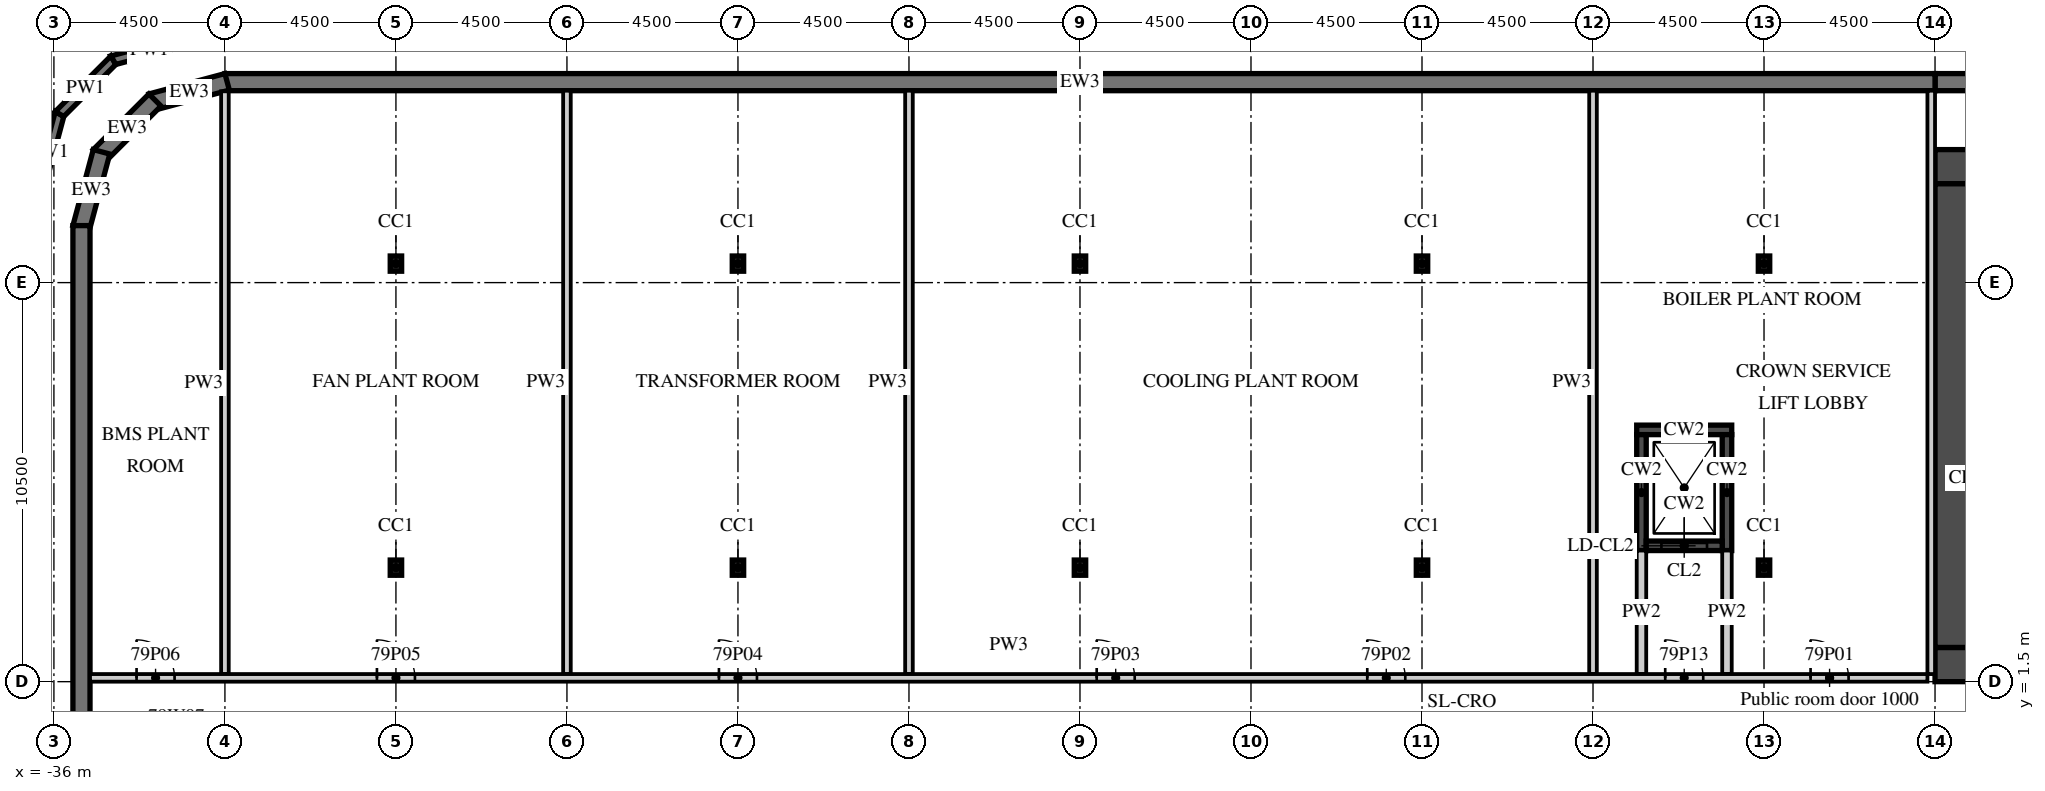
"""IFC4 building model, lengths in metres.
Left out: names, types, materials, properties, quantities, classifications, styles, units other than length and angle.
Written with IfcOpenShell. Run it as: python <this file> out.ifc"""

import sys

from ifc_helpers import new_model, si_unit, direction, frame, frame_2d, origin, origin_2d, place, context, subcontext, project, spatial, polyline, rectangle, i_section, outline, extrude, element, fill, save


model = new_model("IFC4")
c1 = context("Model", 3, precision=1e-05, world=origin(), true_north=direction((0.0, 1.0)))
c2 = subcontext(c1, "Body", "Model", "MODEL_VIEW")
j1 = project(units=[si_unit("LENGTHUNIT", "METRE"), si_unit("PLANEANGLEUNIT", "RADIAN")], contexts=[c1])
p1 = place(None, origin())
s1 = spatial("IfcSite", under=j1, at=p1, CompositionType="ELEMENT")
p2 = place(p1, origin())
s2 = spatial("IfcBuilding", under=s1, at=p2, CompositionType="ELEMENT")
p3 = place(p2, frame((0.0, 0.0, 313.6)))
s3 = spatial("IfcBuildingStorey", under=s2, at=p3, CompositionType="ELEMENT", Elevation=313.6)
for number, where, z_axis, x_axis in (
    (1, (-27.0, 4.5, 0.0), (0.0, 0.0, 1.0), (1.0, 0.0, 0.0)),
    (2, (-27.0, 12.5, 0.0), (0.0, 0.0, 1.0), (1.0, 0.0, 0.0)),
    (3, (-18.0, 4.5, 0.0), (0.0, 0.0, 1.0), (1.0, 0.0, 0.0)),
    (4, (-18.0, 12.5, 0.0), (0.0, 0.0, 1.0), (1.0, 0.0, 0.0)),
    (5, (-9.0, 4.5, 0.0), (0.0, 0.0, 1.0), (1.0, 0.0, 0.0)),
    (6, (-9.0, 12.5, 0.0), (0.0, 0.0, 1.0), (1.0, 0.0, 0.0)),
    (7, (0.0, 4.5, 0.0), (0.0, 0.0, 1.0), (1.0, 0.0, 0.0)),
    (8, (0.0, 12.5, 0.0), (0.0, 0.0, 1.0), (1.0, 0.0, 0.0)),
    (9, (9.0, 4.5, 0.0), (0.0, 0.0, 1.0), (1.0, 0.0, 0.0)),
    (10, (9.0, 12.5, 0.0), (0.0, 0.0, 1.0), (1.0, 0.0, 0.0)),
):
    element("IfcColumn", number, at=place(p3, frame(where, z_axis=z_axis, x_axis=x_axis)), inside=s3, PredefinedType="COLUMN", context=c2, shape_type="SweptSolid", body=[
        extrude(i_section(OverallWidth=0.3, OverallDepth=0.4, WebThickness=0.013, FlangeThickness=0.024, FilletRadius=0.027, at=origin_2d()), origin(), (0.0, 0.0, 1.0), 4.2),
    ])
p4 = place(p3, frame((31.5, 17.275, 0.0), z_axis=(0.0, 0.0, 1.0), x_axis=(-1.0, 0.0, 0.0)))
e11 = element("IfcWall", 11, at=p4, inside=s3, PredefinedType="SOLIDWALL", context=c2, shape_type="SweptSolid", body=[
    extrude(rectangle(XDim=18.0, YDim=0.45, at=frame_2d((9.0, 0.0))), origin(), (0.0, 0.0, 1.0), 3.8),
])
p5 = place(p3, frame((13.5, 17.275, 0.0), z_axis=(0.0, 0.0, 1.0), x_axis=(-1.0, 0.0, 0.0)))
e12 = element("IfcWall", 12, at=p5, inside=s3, PredefinedType="SOLIDWALL", context=c2, shape_type="SweptSolid", body=[
    extrude(rectangle(XDim=45.0, YDim=0.45, at=frame_2d((22.5, 0.0))), origin(), (0.0, 0.0, 1.0), 3.8),
])
p6 = place(p3, frame((-31.442, 17.283, 0.0), z_axis=(0.0, 0.0, 1.0), x_axis=(-0.965926999034, -0.25881466832, 0.0)))
e13 = element("IfcWall", 13, at=p6, inside=s3, PredefinedType="SOLIDWALL", context=c2, shape_type="SweptSolid", body=[
    extrude(outline(polyline([(0.0, -0.225), (2.071, -0.225), (1.95, 0.225), (0.121, 0.225), (0.0, -0.225)])), origin(), (0.0, 0.0, 1.0), 3.8),
])
p7 = place(p3, frame((-33.341, 16.805, 0.0), z_axis=(0.0, 0.0, 1.0), x_axis=(-0.707106781187, -0.707106781187, 0.0)))
e14 = element("IfcWall", 14, at=p7, inside=s3, PredefinedType="SOLIDWALL", context=c2, shape_type="SweptSolid", body=[
    extrude(outline(polyline([(0.0, -0.225), (2.071, -0.225), (1.95, 0.225), (0.121, 0.225), (0.0, -0.225)])), origin(), (0.0, 0.0, 1.0), 3.8),
])
p8 = place(p3, frame((-34.747, 15.442, 0.0), z_axis=(0.0, 0.0, 1.0), x_axis=(-0.25881466832, -0.965926999034, 0.0)))
e15 = element("IfcWall", 15, at=p8, inside=s3, PredefinedType="SOLIDWALL", context=c2, shape_type="SweptSolid", body=[
    extrude(outline(polyline([(-0.0, -0.225), (2.07, -0.225), (1.95, 0.225), (0.12, 0.225), (-0.0, -0.225)])), origin(), (0.0, 0.0, 1.0), 3.8),
])
p9 = place(p3, frame((-35.275, 13.5, 0.0), z_axis=(0.0, 0.0, 1.0), x_axis=(0.0, -1.0, 0.0)))
e16 = element("IfcWall", 16, at=p9, inside=s3, PredefinedType="SOLIDWALL", context=c2, shape_type="SweptSolid", body=[
    extrude(rectangle(XDim=28.0, YDim=0.45, at=frame_2d((14.0, 0.0))), origin(), (0.0, 0.0, 1.0), 3.8),
])
p10 = place(p3, origin())
e17 = element("IfcWall", 17, at=p10, inside=s3, PredefinedType="PARAPET", context=c2, shape_type="SweptSolid", body=[
    extrude(outline(polyline([(-36.5, 14.5), (-36.25, 14.467), (-35.74, 16.371), (-35.964, 16.5), (-36.5, 14.5)])), origin(), (0.0, 0.0, 1.0), 1.1),
])
p11 = place(p3, origin())
e18 = element("IfcWall", 18, at=p11, inside=s3, PredefinedType="PARAPET", context=c2, shape_type="SweptSolid", body=[
    extrude(outline(polyline([(-35.964, 16.5), (-35.74, 16.371), (-34.371, 17.74), (-34.5, 17.964), (-35.964, 16.5)])), origin(), (0.0, 0.0, 1.0), 1.1),
])
p12 = place(p3, origin())
e19 = element("IfcWall", 19, at=p12, inside=s3, PredefinedType="PARAPET", context=c2, shape_type="SweptSolid", body=[
    extrude(outline(polyline([(-34.5, 17.964), (-34.371, 17.74), (-32.467, 18.25), (-32.5, 18.5), (-34.5, 17.964)])), origin(), (0.0, 0.0, 1.0), 1.1),
])
p13 = place(p3, frame((5.65, 8.125, 0.0), z_axis=(0.0, 0.0, 1.0), x_axis=(1.0, 0.0, 0.0)))
e20 = element("IfcWall", 20, at=p13, inside=s3, PredefinedType="SHEAR", context=c2, shape_type="SweptSolid", body=[
    extrude(rectangle(XDim=2.5, YDim=0.25, at=frame_2d((1.25, 0.0))), origin(), (0.0, 0.0, 1.0), 3.8),
])
for number, where, z_axis, x_axis in (
    (21, (8.025, 4.95, 0.0), (0.0, 0.0, 1.0), (0.0, 1.0, 0.0)),
    (22, (5.775, 4.95, 0.0), (0.0, 0.0, 1.0), (0.0, 1.0, 0.0)),
):
    element("IfcWall", number, at=place(p3, frame(where, z_axis=z_axis, x_axis=x_axis)), inside=s3, PredefinedType="SHEAR", context=c2, shape_type="SweptSolid", body=[
        extrude(rectangle(XDim=3.05, YDim=0.25, at=frame_2d((1.525, 0.0))), origin(), (0.0, 0.0, 1.0), 3.8),
    ])
p14 = place(p3, frame((5.9, 5.075, 0.0), z_axis=(0.0, 0.0, 1.0), x_axis=(1.0, 0.0, 0.0)))
e23 = element("IfcWall", 23, at=p14, inside=s3, PredefinedType="SHEAR", context=c2, shape_type="SweptSolid", body=[
    extrude(rectangle(XDim=2.0, YDim=0.25, at=frame_2d((1.0, 0.0))), origin(), (0.0, 0.0, 1.0), 3.8),
])
p15 = place(p14, frame((0.4, 0.0, 0.0)))
e24 = element("IfcOpeningElement", 24, at=p15, cuts=e23, PredefinedType="OPENING", context=c2, shape_type="SweptSolid", body=[
    extrude(rectangle(XDim=1.2, YDim=2.1, at=frame_2d((0.6, 1.05))), frame((0.0, 0.135, 0.0), z_axis=(0.0, -1.0, 0.0), x_axis=(1.0, 0.0, 0.0)), (0.0, 0.0, 1.0), 0.27),
])
for number, where, z_axis, x_axis in (
    (25, (8.025, 1.7, 0.0), (0.0, 0.0, 1.0), (0.0, 1.0, 0.0)),
    (26, (5.775, 1.7, 0.0), (0.0, 0.0, 1.0), (0.0, 1.0, 0.0)),
):
    element("IfcWall", number, at=place(p3, frame(where, z_axis=z_axis, x_axis=x_axis)), inside=s3, PredefinedType="PARTITIONING", context=c2, shape_type="SweptSolid", body=[
        extrude(rectangle(XDim=3.25, YDim=0.25, at=frame_2d((1.625, 0.0))), origin(), (0.0, 0.0, 1.0), 3.8),
    ])
p16 = place(p3, frame((13.5, 1.95, 0.0), z_axis=(0.0, 0.0, 1.0), x_axis=(1.0, 0.0, 0.0)))
e27 = element("IfcWall", 27, at=p16, inside=s3, PredefinedType="SHEAR", context=c2, shape_type="SweptSolid", body=[
    extrude(rectangle(XDim=18.0, YDim=0.9, at=frame_2d((9.0, 0.0))), origin(), (0.0, 0.0, 1.0), 3.8),
])
p17 = place(p16, frame((1.475, 0.0, 0.0)))
e28 = element("IfcOpeningElement", 28, at=p17, cuts=e27, PredefinedType="OPENING", context=c2, shape_type="SweptSolid", body=[
    extrude(rectangle(XDim=1.8, YDim=2.1, at=frame_2d((0.9, 1.05))), frame((0.0, 0.46, 0.0), z_axis=(0.0, -1.0, 0.0), x_axis=(1.0, 0.0, 0.0)), (0.0, 0.0, 1.0), 0.92),
])
p18 = place(p3, frame((13.5, 15.05, 0.0), z_axis=(0.0, 0.0, 1.0), x_axis=(1.0, 0.0, 0.0)))
e29 = element("IfcWall", 29, at=p18, inside=s3, PredefinedType="SHEAR", context=c2, shape_type="SweptSolid", body=[
    extrude(rectangle(XDim=6.8, YDim=0.9, at=frame_2d((3.4, 0.0))), origin(), (0.0, 0.0, 1.0), 3.8),
])
p19 = place(p18, frame((4.725, 0.0, 0.0)))
e30 = element("IfcOpeningElement", 30, at=p19, cuts=e29, PredefinedType="OPENING", context=c2, shape_type="SweptSolid", body=[
    extrude(rectangle(XDim=1.2, YDim=2.1, at=frame_2d((0.6, 1.05))), frame((0.0, 0.46, 0.0), z_axis=(0.0, -1.0, 0.0), x_axis=(1.0, 0.0, 0.0)), (0.0, 0.0, 1.0), 0.92),
])
p20 = place(p3, frame((13.95, 2.4, 0.0), z_axis=(0.0, 0.0, 1.0), x_axis=(0.0, 1.0, 0.0)))
e31 = element("IfcWall", 31, at=p20, inside=s3, PredefinedType="SHEAR", context=c2, shape_type="SweptSolid", body=[
    extrude(rectangle(XDim=12.2, YDim=0.9, at=frame_2d((6.1, 0.0))), origin(), (0.0, 0.0, 1.0), 3.8),
])
for number, where, z_axis, x_axis in (
    (32, (4.5, 1.7, 0.0), (0.0, 0.0, 1.0), (0.0, 1.0, 0.0)),
    (33, (-13.5, 1.7, 0.0), (0.0, 0.0, 1.0), (0.0, 1.0, 0.0)),
    (34, (-22.5, 1.7, 0.0), (0.0, 0.0, 1.0), (0.0, 1.0, 0.0)),
):
    element("IfcWall", number, at=place(p3, frame(where, z_axis=z_axis, x_axis=x_axis)), inside=s3, PredefinedType="PARTITIONING", context=c2, shape_type="SweptSolid", body=[
        extrude(rectangle(XDim=15.35, YDim=0.2, at=frame_2d((7.675, 0.0))), origin(), (0.0, 0.0, 1.0), 3.8),
    ])
p21 = place(p3, frame((-31.5, 1.7, 0.0), z_axis=(0.0, 0.0, 1.0), x_axis=(0.0, 1.0, 0.0)))
e35 = element("IfcWall", 35, at=p21, inside=s3, PredefinedType="PARTITIONING", context=c2, shape_type="SweptSolid", body=[
    extrude(rectangle(XDim=15.334, YDim=0.2, at=frame_2d((7.667, 0.0))), origin(), (0.0, 0.0, 1.0), 3.8),
])
p22 = place(p3, frame((-35.05, 1.6, 0.0), z_axis=(0.0, 0.0, 1.0), x_axis=(1.0, 0.0, 0.0)))
e36 = element("IfcWall", 36, at=p22, inside=s3, PredefinedType="PARTITIONING", context=c2, shape_type="SweptSolid", body=[
    extrude(rectangle(XDim=48.35, YDim=0.2, at=frame_2d((24.175, 0.0))), origin(), (0.0, 0.0, 1.0), 3.3),
])
p23 = place(p22, frame((45.275, 0.0, 0.0)))
e37 = element("IfcOpeningElement", 37, at=p23, cuts=e36, PredefinedType="OPENING", context=c2, shape_type="SweptSolid", body=[
    extrude(rectangle(XDim=1.0, YDim=2.1, at=frame_2d((0.5, 1.05))), frame((0.0, 0.11, 0.0), z_axis=(0.0, -1.0, 0.0), x_axis=(1.0, 0.0, 0.0)), (0.0, 0.0, 1.0), 0.22),
])
p24 = place(p22, frame((33.61, 0.0, 0.0)))
e38 = element("IfcOpeningElement", 38, at=p24, cuts=e36, PredefinedType="OPENING", context=c2, shape_type="SweptSolid", body=[
    extrude(rectangle(XDim=1.0, YDim=2.1, at=frame_2d((0.5, 1.05))), frame((0.0, 0.11, 0.0), z_axis=(0.0, -1.0, 0.0), x_axis=(1.0, 0.0, 0.0)), (0.0, 0.0, 1.0), 0.22),
])
p25 = place(p22, frame((26.49, 0.0, 0.0)))
e39 = element("IfcOpeningElement", 39, at=p25, cuts=e36, PredefinedType="OPENING", context=c2, shape_type="SweptSolid", body=[
    extrude(rectangle(XDim=1.0, YDim=2.1, at=frame_2d((0.5, 1.05))), frame((0.0, 0.11, 0.0), z_axis=(0.0, -1.0, 0.0), x_axis=(1.0, 0.0, 0.0)), (0.0, 0.0, 1.0), 0.22),
])
p26 = place(p22, frame((16.55, 0.0, 0.0)))
e40 = element("IfcOpeningElement", 40, at=p26, cuts=e36, PredefinedType="OPENING", context=c2, shape_type="SweptSolid", body=[
    extrude(rectangle(XDim=1.0, YDim=2.1, at=frame_2d((0.5, 1.05))), frame((0.0, 0.11, 0.0), z_axis=(0.0, -1.0, 0.0), x_axis=(1.0, 0.0, 0.0)), (0.0, 0.0, 1.0), 0.22),
])
p27 = place(p22, frame((7.55, 0.0, 0.0)))
e41 = element("IfcOpeningElement", 41, at=p27, cuts=e36, PredefinedType="OPENING", context=c2, shape_type="SweptSolid", body=[
    extrude(rectangle(XDim=1.0, YDim=2.1, at=frame_2d((0.5, 1.05))), frame((0.0, 0.11, 0.0), z_axis=(0.0, -1.0, 0.0), x_axis=(1.0, 0.0, 0.0)), (0.0, 0.0, 1.0), 0.22),
])
p28 = place(p22, frame((1.225, 0.0, 0.0)))
e42 = element("IfcOpeningElement", 42, at=p28, cuts=e36, PredefinedType="OPENING", context=c2, shape_type="SweptSolid", body=[
    extrude(rectangle(XDim=1.0, YDim=2.1, at=frame_2d((0.5, 1.05))), frame((0.0, 0.11, 0.0), z_axis=(0.0, -1.0, 0.0), x_axis=(1.0, 0.0, 0.0)), (0.0, 0.0, 1.0), 0.22),
])
p29 = place(p22, frame((41.45, 0.0, 0.0)))
e43 = element("IfcOpeningElement", 43, at=p29, cuts=e36, PredefinedType="OPENING", context=c2, shape_type="SweptSolid", body=[
    extrude(rectangle(XDim=1.0, YDim=2.1, at=frame_2d((0.5, 1.05))), frame((0.0, 0.11, 0.0), z_axis=(0.0, -1.0, 0.0), x_axis=(1.0, 0.0, 0.0)), (0.0, 0.0, 1.0), 0.22),
])
p30 = place(p3, frame((13.4, 1.7, 0.0), z_axis=(0.0, 0.0, 1.0), x_axis=(0.0, 1.0, 0.0)))
e44 = element("IfcWall", 44, at=p30, inside=s3, PredefinedType="PARTITIONING", context=c2, shape_type="SweptSolid", body=[
    extrude(rectangle(XDim=15.35, YDim=0.2, at=frame_2d((7.675, 0.0))), origin(), (0.0, 0.0, 1.0), 3.8),
])
p31 = place(p15, origin())
e45 = element("IfcDoor", 45, at=p31, inside=s3, OperationType="SLIDING_TO_LEFT", PredefinedType="DOOR", context=c2, shape_type="SweptSolid", body=[
    extrude(rectangle(XDim=1.2, YDim=2.1, at=frame_2d((0.6, 1.05))), frame((0.0, 0.025, 0.0), z_axis=(0.0, -1.0, 0.0), x_axis=(1.0, 0.0, 0.0)), (0.0, 0.0, 1.0), 0.05),
])
fill(e24, e45)
p32 = place(p23, origin())
e46 = element("IfcDoor", 46, at=p32, inside=s3, OperationType="SINGLE_SWING_LEFT", PredefinedType="DOOR", context=c2, shape_type="SweptSolid", body=[
    extrude(rectangle(XDim=1.0, YDim=2.1, at=frame_2d((0.5, 1.05))), frame((0.0, 0.025, 0.0), z_axis=(0.0, -1.0, 0.0), x_axis=(1.0, 0.0, 0.0)), (0.0, 0.0, 1.0), 0.05),
])
fill(e37, e46)
p33 = place(p24, origin())
e47 = element("IfcDoor", 47, at=p33, inside=s3, OperationType="SINGLE_SWING_LEFT", PredefinedType="DOOR", context=c2, shape_type="SweptSolid", body=[
    extrude(rectangle(XDim=1.0, YDim=2.1, at=frame_2d((0.5, 1.05))), frame((0.0, 0.025, 0.0), z_axis=(0.0, -1.0, 0.0), x_axis=(1.0, 0.0, 0.0)), (0.0, 0.0, 1.0), 0.05),
])
fill(e38, e47)
p34 = place(p25, origin())
e48 = element("IfcDoor", 48, at=p34, inside=s3, OperationType="SINGLE_SWING_LEFT", PredefinedType="DOOR", context=c2, shape_type="SweptSolid", body=[
    extrude(rectangle(XDim=1.0, YDim=2.1, at=frame_2d((0.5, 1.05))), frame((0.0, 0.025, 0.0), z_axis=(0.0, -1.0, 0.0), x_axis=(1.0, 0.0, 0.0)), (0.0, 0.0, 1.0), 0.05),
])
fill(e39, e48)
p35 = place(p26, origin())
e49 = element("IfcDoor", 49, at=p35, inside=s3, OperationType="SINGLE_SWING_LEFT", PredefinedType="DOOR", context=c2, shape_type="SweptSolid", body=[
    extrude(rectangle(XDim=1.0, YDim=2.1, at=frame_2d((0.5, 1.05))), frame((0.0, 0.025, 0.0), z_axis=(0.0, -1.0, 0.0), x_axis=(1.0, 0.0, 0.0)), (0.0, 0.0, 1.0), 0.05),
])
fill(e40, e49)
p36 = place(p27, origin())
e50 = element("IfcDoor", 50, at=p36, inside=s3, OperationType="SINGLE_SWING_LEFT", PredefinedType="DOOR", context=c2, shape_type="SweptSolid", body=[
    extrude(rectangle(XDim=1.0, YDim=2.1, at=frame_2d((0.5, 1.05))), frame((0.0, 0.025, 0.0), z_axis=(0.0, -1.0, 0.0), x_axis=(1.0, 0.0, 0.0)), (0.0, 0.0, 1.0), 0.05),
])
fill(e41, e50)
p37 = place(p28, origin())
e51 = element("IfcDoor", 51, at=p37, inside=s3, OperationType="SINGLE_SWING_LEFT", PredefinedType="DOOR", context=c2, shape_type="SweptSolid", body=[
    extrude(rectangle(XDim=1.0, YDim=2.1, at=frame_2d((0.5, 1.05))), frame((0.0, 0.025, 0.0), z_axis=(0.0, -1.0, 0.0), x_axis=(1.0, 0.0, 0.0)), (0.0, 0.0, 1.0), 0.05),
])
fill(e42, e51)
p38 = place(p29, origin())
e52 = element("IfcDoor", 52, at=p38, inside=s3, OperationType="SINGLE_SWING_LEFT", PredefinedType="DOOR", context=c2, shape_type="SweptSolid", body=[
    extrude(rectangle(XDim=1.0, YDim=2.1, at=frame_2d((0.5, 1.05))), frame((0.0, 0.025, 0.0), z_axis=(0.0, -1.0, 0.0), x_axis=(1.0, 0.0, 0.0)), (0.0, 0.0, 1.0), 0.05),
])
fill(e43, e52)
save(model, sys.argv[1])
